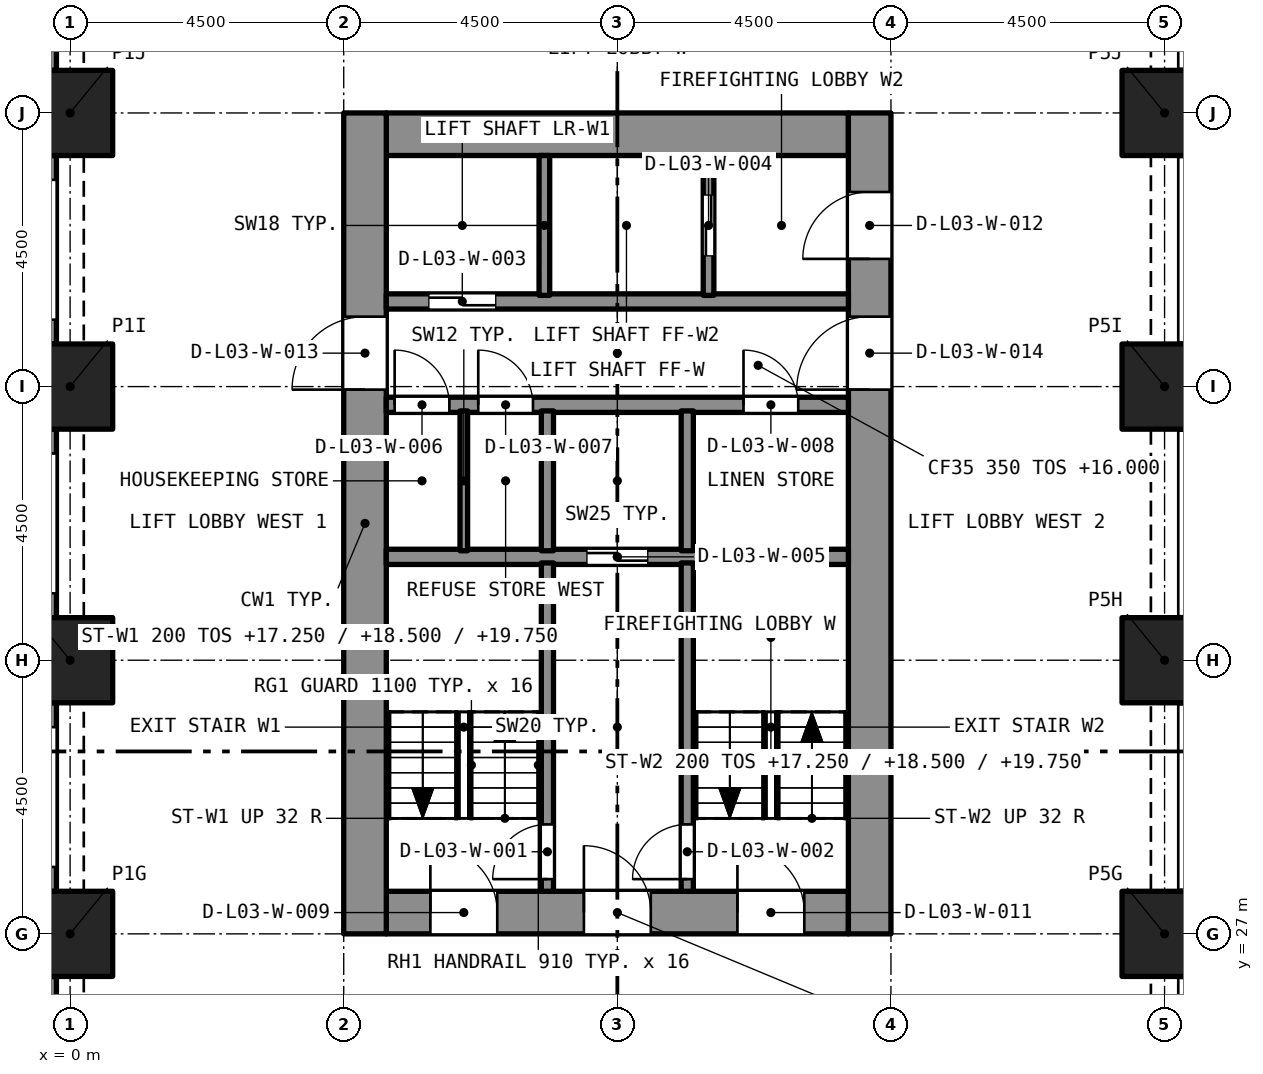
"""IFC4 building model, lengths in metres.
Left out: names, types, materials, properties, quantities, classifications, styles, units other than length and angle.
Written with IfcOpenShell. Run it as: python <this file> out.ifc"""

import sys

from ifc_helpers import new_model, si_unit, direction, frame, frame_2d, origin, origin_2d, place, context, subcontext, project, spatial, rectangle, extrude, element, fill, save


model = new_model("IFC4")
c1 = context("Model", 3, precision=1e-05, world=origin(), true_north=direction((0.0, 1.0)))
c2 = subcontext(c1, "Body", "Model", "MODEL_VIEW")
j1 = project(units=[si_unit("LENGTHUNIT", "METRE"), si_unit("PLANEANGLEUNIT", "RADIAN")], contexts=[c1])
p1 = place(None, origin())
s1 = spatial("IfcSite", under=j1, at=p1, CompositionType="ELEMENT")
p2 = place(p1, origin())
s2 = spatial("IfcBuilding", under=s1, at=p2, CompositionType="ELEMENT")
p3 = place(p2, frame((0.0, 0.0, 16.0)))
s3 = spatial("IfcBuildingStorey", under=s2, at=p3, CompositionType="ELEMENT", Elevation=16.0)
for number, where, z_axis, x_axis in (
    (1, (0.0, 27.0, 0.0), (0.0, 0.0, 1.0), (1.0, 0.0, 0.0)),
    (2, (18.0, 27.0, 0.0), (0.0, 0.0, 1.0), (1.0, 0.0, 0.0)),
    (3, (0.0, 31.5, 0.0), (0.0, 0.0, 1.0), (1.0, 0.0, 0.0)),
    (4, (18.0, 31.5, 0.0), (0.0, 0.0, 1.0), (1.0, 0.0, 0.0)),
    (5, (0.0, 36.0, 0.0), (0.0, 0.0, 1.0), (1.0, 0.0, 0.0)),
    (6, (18.0, 36.0, 0.0), (0.0, 0.0, 1.0), (1.0, 0.0, 0.0)),
    (7, (0.0, 40.5, 0.0), (0.0, 0.0, 1.0), (1.0, 0.0, 0.0)),
    (8, (18.0, 40.5, 0.0), (0.0, 0.0, 1.0), (1.0, 0.0, 0.0)),
):
    element("IfcColumn", number, at=place(p3, frame(where, z_axis=z_axis, x_axis=x_axis)), inside=s3, PredefinedType="COLUMN", context=c2, shape_type="SweptSolid", body=[
        extrude(rectangle(XDim=1.4, YDim=1.4, at=origin_2d()), origin(), (0.0, 0.0, 1.0), 5.0),
    ])
p4 = place(p3, frame((5.2, 27.35, 0.0), z_axis=(0.0, 0.0, 1.0), x_axis=(1.0, 0.0, 0.0)))
e9 = element("IfcWall", 9, at=p4, inside=s3, PredefinedType="SOLIDWALL", context=c2, shape_type="SweptSolid", body=[
    extrude(rectangle(XDim=7.6, YDim=0.7, at=frame_2d((3.8, 0.0))), origin(), (0.0, 0.0, 1.0), 5.0),
])
p5 = place(p4, frame((0.725, 0.0, 0.0)))
e10 = element("IfcOpeningElement", 10, at=p5, cuts=e9, PredefinedType="OPENING", context=c2, shape_type="SweptSolid", body=[
    extrude(rectangle(XDim=1.1, YDim=2.1, at=frame_2d((0.55, 1.05))), frame((0.0, 0.36, 0.0), z_axis=(0.0, -1.0, 0.0), x_axis=(1.0, 0.0, 0.0)), (0.0, 0.0, 1.0), 0.72),
])
p6 = place(p4, frame((3.25, 0.0, 0.0)))
e11 = element("IfcOpeningElement", 11, at=p6, cuts=e9, PredefinedType="OPENING", context=c2, shape_type="SweptSolid", body=[
    extrude(rectangle(XDim=1.1, YDim=2.1, at=frame_2d((0.55, 1.05))), frame((0.0, 0.36, 0.0), z_axis=(0.0, -1.0, 0.0), x_axis=(1.0, 0.0, 0.0)), (0.0, 0.0, 1.0), 0.72),
])
p7 = place(p4, frame((5.775, 0.0, 0.0)))
e12 = element("IfcOpeningElement", 12, at=p7, cuts=e9, PredefinedType="OPENING", context=c2, shape_type="SweptSolid", body=[
    extrude(rectangle(XDim=1.1, YDim=2.1, at=frame_2d((0.55, 1.05))), frame((0.0, 0.36, 0.0), z_axis=(0.0, -1.0, 0.0), x_axis=(1.0, 0.0, 0.0)), (0.0, 0.0, 1.0), 0.72),
])
p8 = place(p3, frame((5.2, 40.15, 0.0), z_axis=(0.0, 0.0, 1.0), x_axis=(1.0, 0.0, 0.0)))
e13 = element("IfcWall", 13, at=p8, inside=s3, PredefinedType="SOLIDWALL", context=c2, shape_type="SweptSolid", body=[
    extrude(rectangle(XDim=7.6, YDim=0.7, at=frame_2d((3.8, 0.0))), origin(), (0.0, 0.0, 1.0), 5.0),
])
p9 = place(p3, frame((4.85, 27.0, 0.0), z_axis=(0.0, 0.0, 1.0), x_axis=(0.0, 1.0, 0.0)))
e14 = element("IfcWall", 14, at=p9, inside=s3, PredefinedType="SOLIDWALL", context=c2, shape_type="SweptSolid", body=[
    extrude(rectangle(XDim=13.5, YDim=0.7, at=frame_2d((6.75, 0.0))), origin(), (0.0, 0.0, 1.0), 5.0),
])
p10 = place(p9, frame((8.95, 0.0, 0.0)))
e15 = element("IfcOpeningElement", 15, at=p10, cuts=e14, PredefinedType="OPENING", context=c2, shape_type="SweptSolid", body=[
    extrude(rectangle(XDim=1.2, YDim=2.1, at=frame_2d((0.6, 1.05))), frame((0.0, 0.36, 0.0), z_axis=(0.0, -1.0, 0.0), x_axis=(1.0, 0.0, 0.0)), (0.0, 0.0, 1.0), 0.72),
])
p11 = place(p3, frame((13.15, 27.0, 0.0), z_axis=(0.0, 0.0, 1.0), x_axis=(0.0, 1.0, 0.0)))
e16 = element("IfcWall", 16, at=p11, inside=s3, PredefinedType="SOLIDWALL", context=c2, shape_type="SweptSolid", body=[
    extrude(rectangle(XDim=13.5, YDim=0.7, at=frame_2d((6.75, 0.0))), origin(), (0.0, 0.0, 1.0), 5.0),
])
p12 = place(p11, frame((11.1, 0.0, 0.0)))
e17 = element("IfcOpeningElement", 17, at=p12, cuts=e16, PredefinedType="OPENING", context=c2, shape_type="SweptSolid", body=[
    extrude(rectangle(XDim=1.1, YDim=2.1, at=frame_2d((0.55, 1.05))), frame((0.0, 0.36, 0.0), z_axis=(0.0, -1.0, 0.0), x_axis=(1.0, 0.0, 0.0)), (0.0, 0.0, 1.0), 0.72),
])
p13 = place(p11, frame((8.95, 0.0, 0.0)))
e18 = element("IfcOpeningElement", 18, at=p13, cuts=e16, PredefinedType="OPENING", context=c2, shape_type="SweptSolid", body=[
    extrude(rectangle(XDim=1.2, YDim=2.1, at=frame_2d((0.6, 1.05))), frame((0.0, 0.36, 0.0), z_axis=(0.0, -1.0, 0.0), x_axis=(1.0, 0.0, 0.0)), (0.0, 0.0, 1.0), 0.72),
])
p14 = place(p3, frame((-0.375, 41.2, 0.0), z_axis=(0.0, 0.0, 1.0), x_axis=(0.0, 1.0, 0.0)))
e19 = element("IfcWall", 19, at=p14, inside=s3, PredefinedType="SOLIDWALL", context=c2, shape_type="SweptSolid", body=[
    extrude(rectangle(XDim=3.1, YDim=0.3, at=frame_2d((1.55, 0.0))), origin(), (0.0, 0.0, 1.0), 5.0),
])
p15 = place(p14, frame((0.4, 0.0, 0.45)))
e20 = element("IfcOpeningElement", 20, at=p15, cuts=e19, PredefinedType="OPENING", context=c2, shape_type="SweptSolid", body=[
    extrude(rectangle(XDim=2.3, YDim=3.3, at=frame_2d((1.15, 1.65))), frame((0.0, 0.16, 0.0), z_axis=(0.0, -1.0, 0.0), x_axis=(1.0, 0.0, 0.0)), (0.0, 0.0, 1.0), 0.32),
])
p16 = place(p3, frame((-0.375, 36.7, 0.0), z_axis=(0.0, 0.0, 1.0), x_axis=(0.0, 1.0, 0.0)))
e21 = element("IfcWall", 21, at=p16, inside=s3, PredefinedType="SOLIDWALL", context=c2, shape_type="SweptSolid", body=[
    extrude(rectangle(XDim=3.1, YDim=0.3, at=frame_2d((1.55, 0.0))), origin(), (0.0, 0.0, 1.0), 5.0),
])
p17 = place(p16, frame((0.4, 0.0, 0.45)))
e22 = element("IfcOpeningElement", 22, at=p17, cuts=e21, PredefinedType="OPENING", context=c2, shape_type="SweptSolid", body=[
    extrude(rectangle(XDim=2.3, YDim=3.3, at=frame_2d((1.15, 1.65))), frame((0.0, 0.16, 0.0), z_axis=(0.0, -1.0, 0.0), x_axis=(1.0, 0.0, 0.0)), (0.0, 0.0, 1.0), 0.32),
])
p18 = place(p3, frame((-0.375, 32.2, 0.0), z_axis=(0.0, 0.0, 1.0), x_axis=(0.0, 1.0, 0.0)))
e23 = element("IfcWall", 23, at=p18, inside=s3, PredefinedType="SOLIDWALL", context=c2, shape_type="SweptSolid", body=[
    extrude(rectangle(XDim=3.1, YDim=0.3, at=frame_2d((1.55, 0.0))), origin(), (0.0, 0.0, 1.0), 5.0),
])
p19 = place(p18, frame((0.4, 0.0, 0.45)))
e24 = element("IfcOpeningElement", 24, at=p19, cuts=e23, PredefinedType="OPENING", context=c2, shape_type="SweptSolid", body=[
    extrude(rectangle(XDim=2.3, YDim=3.3, at=frame_2d((1.15, 1.65))), frame((0.0, 0.16, 0.0), z_axis=(0.0, -1.0, 0.0), x_axis=(1.0, 0.0, 0.0)), (0.0, 0.0, 1.0), 0.32),
])
p20 = place(p3, frame((-0.375, 27.7, 0.0), z_axis=(0.0, 0.0, 1.0), x_axis=(0.0, 1.0, 0.0)))
e25 = element("IfcWall", 25, at=p20, inside=s3, PredefinedType="SOLIDWALL", context=c2, shape_type="SweptSolid", body=[
    extrude(rectangle(XDim=3.1, YDim=0.3, at=frame_2d((1.55, 0.0))), origin(), (0.0, 0.0, 1.0), 5.0),
])
p21 = place(p20, frame((0.4, 0.0, 0.45)))
e26 = element("IfcOpeningElement", 26, at=p21, cuts=e25, PredefinedType="OPENING", context=c2, shape_type="SweptSolid", body=[
    extrude(rectangle(XDim=2.3, YDim=3.3, at=frame_2d((1.15, 1.65))), frame((0.0, 0.16, 0.0), z_axis=(0.0, -1.0, 0.0), x_axis=(1.0, 0.0, 0.0)), (0.0, 0.0, 1.0), 0.32),
])
p22 = place(p3, frame((-0.375, 23.2, 0.0), z_axis=(0.0, 0.0, 1.0), x_axis=(0.0, 1.0, 0.0)))
e27 = element("IfcWall", 27, at=p22, inside=s3, PredefinedType="SOLIDWALL", context=c2, shape_type="SweptSolid", body=[
    extrude(rectangle(XDim=3.1, YDim=0.3, at=frame_2d((1.55, 0.0))), origin(), (0.0, 0.0, 1.0), 5.0),
])
p23 = place(p22, frame((0.4, 0.0, 0.45)))
e28 = element("IfcOpeningElement", 28, at=p23, cuts=e27, PredefinedType="OPENING", context=c2, shape_type="SweptSolid", body=[
    extrude(rectangle(XDim=2.3, YDim=3.3, at=frame_2d((1.15, 1.65))), frame((0.0, 0.16, 0.0), z_axis=(0.0, -1.0, 0.0), x_axis=(1.0, 0.0, 0.0)), (0.0, 0.0, 1.0), 0.32),
])
p24 = place(p3, frame((5.2, 33.2, 0.0), z_axis=(0.0, 0.0, 1.0), x_axis=(1.0, 0.0, 0.0)))
e29 = element("IfcWall", 29, at=p24, inside=s3, PredefinedType="SOLIDWALL", context=c2, shape_type="SweptSolid", body=[
    extrude(rectangle(XDim=7.6, YDim=0.25, at=frame_2d((3.8, 0.0))), origin(), (0.0, 0.0, 1.0), 4.65),
])
p25 = place(p24, frame((3.3, 0.0, 0.0)))
e30 = element("IfcOpeningElement", 30, at=p25, cuts=e29, PredefinedType="OPENING", context=c2, shape_type="SweptSolid", body=[
    extrude(rectangle(XDim=1.0, YDim=2.1, at=frame_2d((0.5, 1.05))), frame((0.0, 0.135, 0.0), z_axis=(0.0, -1.0, 0.0), x_axis=(1.0, 0.0, 0.0)), (0.0, 0.0, 1.0), 0.27),
])
p26 = place(p3, frame((5.2, 35.7, 0.0), z_axis=(0.0, 0.0, 1.0), x_axis=(1.0, 0.0, 0.0)))
e31 = element("IfcWall", 31, at=p26, inside=s3, PredefinedType="SOLIDWALL", context=c2, shape_type="SweptSolid", body=[
    extrude(rectangle(XDim=7.6, YDim=0.25, at=frame_2d((3.8, 0.0))), origin(), (0.0, 0.0, 1.0), 4.65),
])
p27 = place(p26, frame((0.137, 0.0, 0.0)))
e32 = element("IfcOpeningElement", 32, at=p27, cuts=e31, PredefinedType="OPENING", context=c2, shape_type="SweptSolid", body=[
    extrude(rectangle(XDim=0.9, YDim=2.1, at=frame_2d((0.45, 1.05))), frame((0.0, 0.135, 0.0), z_axis=(0.0, -1.0, 0.0), x_axis=(1.0, 0.0, 0.0)), (0.0, 0.0, 1.0), 0.27),
])
p28 = place(p26, frame((1.512, 0.0, 0.0)))
e33 = element("IfcOpeningElement", 33, at=p28, cuts=e31, PredefinedType="OPENING", context=c2, shape_type="SweptSolid", body=[
    extrude(rectangle(XDim=0.9, YDim=2.1, at=frame_2d((0.45, 1.05))), frame((0.0, 0.135, 0.0), z_axis=(0.0, -1.0, 0.0), x_axis=(1.0, 0.0, 0.0)), (0.0, 0.0, 1.0), 0.27),
])
p29 = place(p26, frame((5.875, 0.0, 0.0)))
e34 = element("IfcOpeningElement", 34, at=p29, cuts=e31, PredefinedType="OPENING", context=c2, shape_type="SweptSolid", body=[
    extrude(rectangle(XDim=0.9, YDim=2.1, at=frame_2d((0.45, 1.05))), frame((0.0, 0.135, 0.0), z_axis=(0.0, -1.0, 0.0), x_axis=(1.0, 0.0, 0.0)), (0.0, 0.0, 1.0), 0.27),
])
p30 = place(p3, frame((5.2, 37.4, 0.0), z_axis=(0.0, 0.0, 1.0), x_axis=(1.0, 0.0, 0.0)))
e35 = element("IfcWall", 35, at=p30, inside=s3, PredefinedType="SOLIDWALL", context=c2, shape_type="SweptSolid", body=[
    extrude(rectangle(XDim=7.6, YDim=0.25, at=frame_2d((3.8, 0.0))), origin(), (0.0, 0.0, 1.0), 4.65),
])
p31 = place(p30, frame((0.7, 0.0, 0.0)))
e36 = element("IfcOpeningElement", 36, at=p31, cuts=e35, PredefinedType="OPENING", context=c2, shape_type="SweptSolid", body=[
    extrude(rectangle(XDim=1.1, YDim=2.4, at=frame_2d((0.55, 1.2))), frame((0.0, 0.135, 0.0), z_axis=(0.0, -1.0, 0.0), x_axis=(1.0, 0.0, 0.0)), (0.0, 0.0, 1.0), 0.27),
])
p32 = place(p3, frame((7.85, 27.7, 0.0), z_axis=(0.0, 0.0, 1.0), x_axis=(0.0, 1.0, 0.0)))
e37 = element("IfcWall", 37, at=p32, inside=s3, PredefinedType="SOLIDWALL", context=c2, shape_type="SweptSolid", body=[
    extrude(rectangle(XDim=5.4, YDim=0.2, at=frame_2d((2.7, 0.0))), origin(), (0.0, 0.0, 1.0), 4.65),
])
p33 = place(p32, frame((0.2, 0.0, 0.0)))
e38 = element("IfcOpeningElement", 38, at=p33, cuts=e37, PredefinedType="OPENING", context=c2, shape_type="SweptSolid", body=[
    extrude(rectangle(XDim=0.9, YDim=2.1, at=frame_2d((0.45, 1.05))), frame((0.0, 0.11, 0.0), z_axis=(0.0, -1.0, 0.0), x_axis=(1.0, 0.0, 0.0)), (0.0, 0.0, 1.0), 0.22),
])
p34 = place(p3, frame((10.15, 27.7, 0.0), z_axis=(0.0, 0.0, 1.0), x_axis=(0.0, 1.0, 0.0)))
e39 = element("IfcWall", 39, at=p34, inside=s3, PredefinedType="SOLIDWALL", context=c2, shape_type="SweptSolid", body=[
    extrude(rectangle(XDim=5.4, YDim=0.2, at=frame_2d((2.7, 0.0))), origin(), (0.0, 0.0, 1.0), 4.65),
])
p35 = place(p34, frame((0.2, 0.0, 0.0)))
e40 = element("IfcOpeningElement", 40, at=p35, cuts=e39, PredefinedType="OPENING", context=c2, shape_type="SweptSolid", body=[
    extrude(rectangle(XDim=0.9, YDim=2.1, at=frame_2d((0.45, 1.05))), frame((0.0, 0.11, 0.0), z_axis=(0.0, -1.0, 0.0), x_axis=(1.0, 0.0, 0.0)), (0.0, 0.0, 1.0), 0.22),
])
for number, where, z_axis, x_axis in (
    (41, (7.85, 33.3, 0.0), (0.0, 0.0, 1.0), (0.0, 1.0, 0.0)),
    (42, (10.15, 33.3, 0.0), (0.0, 0.0, 1.0), (0.0, 1.0, 0.0)),
):
    element("IfcWall", number, at=place(p3, frame(where, z_axis=z_axis, x_axis=x_axis)), inside=s3, PredefinedType="SOLIDWALL", context=c2, shape_type="SweptSolid", body=[
        extrude(rectangle(XDim=2.3, YDim=0.2, at=frame_2d((1.15, 0.0))), origin(), (0.0, 0.0, 1.0), 4.65),
    ])
p36 = place(p3, frame((7.8, 37.5, 0.0), z_axis=(0.0, 0.0, 1.0), x_axis=(0.0, 1.0, 0.0)))
e43 = element("IfcWall", 43, at=p36, inside=s3, PredefinedType="SOLIDWALL", context=c2, shape_type="SweptSolid", body=[
    extrude(rectangle(XDim=2.3, YDim=0.175, at=frame_2d((1.15, 0.0))), origin(), (0.0, 0.0, 1.0), 4.65),
])
p37 = place(p3, frame((10.5, 37.5, 0.0), z_axis=(0.0, 0.0, 1.0), x_axis=(0.0, 1.0, 0.0)))
e44 = element("IfcWall", 44, at=p37, inside=s3, PredefinedType="SOLIDWALL", context=c2, shape_type="SweptSolid", body=[
    extrude(rectangle(XDim=2.3, YDim=0.175, at=frame_2d((1.15, 0.0))), origin(), (0.0, 0.0, 1.0), 4.65),
])
p38 = place(p37, frame((0.65, 0.0, 0.0)))
e45 = element("IfcOpeningElement", 45, at=p38, cuts=e44, PredefinedType="OPENING", context=c2, shape_type="SweptSolid", body=[
    extrude(rectangle(XDim=1.0, YDim=2.1, at=frame_2d((0.5, 1.05))), frame((0.0, 0.097, 0.0), z_axis=(0.0, -1.0, 0.0), x_axis=(1.0, 0.0, 0.0)), (0.0, 0.0, 1.0), 0.195),
])
p39 = place(p3, frame((6.475, 33.3, 0.0), z_axis=(0.0, 0.0, 1.0), x_axis=(0.0, 1.0, 0.0)))
e46 = element("IfcWall", 46, at=p39, inside=s3, PredefinedType="PARTITIONING", context=c2, shape_type="SweptSolid", body=[
    extrude(rectangle(XDim=2.3, YDim=0.125, at=frame_2d((1.15, 0.0))), origin(), (0.0, 0.0, 1.0), 4.65),
])
p40 = place(p33, origin())
e47 = element("IfcDoor", 47, at=p40, inside=s3, OperationType="SINGLE_SWING_LEFT", PredefinedType="DOOR", context=c2, shape_type="SweptSolid", body=[
    extrude(rectangle(XDim=0.9, YDim=2.1, at=frame_2d((0.45, 1.05))), frame((0.0, 0.025, 0.0), z_axis=(0.0, -1.0, 0.0), x_axis=(1.0, 0.0, 0.0)), (0.0, 0.0, 1.0), 0.05),
])
fill(e38, e47)
p41 = place(p35, origin())
e48 = element("IfcDoor", 48, at=p41, inside=s3, OperationType="SINGLE_SWING_LEFT", PredefinedType="DOOR", context=c2, shape_type="SweptSolid", body=[
    extrude(rectangle(XDim=0.9, YDim=2.1, at=frame_2d((0.45, 1.05))), frame((0.0, 0.025, 0.0), z_axis=(0.0, -1.0, 0.0), x_axis=(1.0, 0.0, 0.0)), (0.0, 0.0, 1.0), 0.05),
])
fill(e40, e48)
p42 = place(p31, origin())
e49 = element("IfcDoor", 49, at=p42, inside=s3, OperationType="SLIDING_TO_LEFT", PredefinedType="DOOR", context=c2, shape_type="SweptSolid", body=[
    extrude(rectangle(XDim=1.1, YDim=2.4, at=frame_2d((0.55, 1.2))), frame((0.0, 0.025, 0.0), z_axis=(0.0, -1.0, 0.0), x_axis=(1.0, 0.0, 0.0)), (0.0, 0.0, 1.0), 0.05),
])
fill(e36, e49)
p43 = place(p38, origin())
e50 = element("IfcDoor", 50, at=p43, inside=s3, OperationType="SLIDING_TO_LEFT", PredefinedType="DOOR", context=c2, shape_type="SweptSolid", body=[
    extrude(rectangle(XDim=1.0, YDim=2.1, at=frame_2d((0.5, 1.05))), frame((0.0, 0.025, 0.0), z_axis=(0.0, -1.0, 0.0), x_axis=(1.0, 0.0, 0.0)), (0.0, 0.0, 1.0), 0.05),
])
fill(e45, e50)
p44 = place(p25, origin())
e51 = element("IfcDoor", 51, at=p44, inside=s3, OperationType="SLIDING_TO_LEFT", PredefinedType="DOOR", context=c2, shape_type="SweptSolid", body=[
    extrude(rectangle(XDim=1.0, YDim=2.1, at=frame_2d((0.5, 1.05))), frame((0.0, 0.025, 0.0), z_axis=(0.0, -1.0, 0.0), x_axis=(1.0, 0.0, 0.0)), (0.0, 0.0, 1.0), 0.05),
])
fill(e30, e51)
p45 = place(p27, origin())
e52 = element("IfcDoor", 52, at=p45, inside=s3, OperationType="SINGLE_SWING_LEFT", PredefinedType="DOOR", context=c2, shape_type="SweptSolid", body=[
    extrude(rectangle(XDim=0.9, YDim=2.1, at=frame_2d((0.45, 1.05))), frame((0.0, 0.025, 0.0), z_axis=(0.0, -1.0, 0.0), x_axis=(1.0, 0.0, 0.0)), (0.0, 0.0, 1.0), 0.05),
])
fill(e32, e52)
p46 = place(p28, origin())
e53 = element("IfcDoor", 53, at=p46, inside=s3, OperationType="SINGLE_SWING_LEFT", PredefinedType="DOOR", context=c2, shape_type="SweptSolid", body=[
    extrude(rectangle(XDim=0.9, YDim=2.1, at=frame_2d((0.45, 1.05))), frame((0.0, 0.025, 0.0), z_axis=(0.0, -1.0, 0.0), x_axis=(1.0, 0.0, 0.0)), (0.0, 0.0, 1.0), 0.05),
])
fill(e33, e53)
p47 = place(p29, origin())
e54 = element("IfcDoor", 54, at=p47, inside=s3, OperationType="SINGLE_SWING_LEFT", PredefinedType="DOOR", context=c2, shape_type="SweptSolid", body=[
    extrude(rectangle(XDim=0.9, YDim=2.1, at=frame_2d((0.45, 1.05))), frame((0.0, 0.025, 0.0), z_axis=(0.0, -1.0, 0.0), x_axis=(1.0, 0.0, 0.0)), (0.0, 0.0, 1.0), 0.05),
])
fill(e34, e54)
p48 = place(p5, origin())
e55 = element("IfcDoor", 55, at=p48, inside=s3, OperationType="SINGLE_SWING_LEFT", PredefinedType="DOOR", context=c2, shape_type="SweptSolid", body=[
    extrude(rectangle(XDim=1.1, YDim=2.1, at=frame_2d((0.55, 1.05))), frame((0.0, 0.025, 0.0), z_axis=(0.0, -1.0, 0.0), x_axis=(1.0, 0.0, 0.0)), (0.0, 0.0, 1.0), 0.05),
])
fill(e10, e55)
p49 = place(p6, origin())
e56 = element("IfcDoor", 56, at=p49, inside=s3, OperationType="SINGLE_SWING_LEFT", PredefinedType="DOOR", context=c2, shape_type="SweptSolid", body=[
    extrude(rectangle(XDim=1.1, YDim=2.1, at=frame_2d((0.55, 1.05))), frame((0.0, 0.025, 0.0), z_axis=(0.0, -1.0, 0.0), x_axis=(1.0, 0.0, 0.0)), (0.0, 0.0, 1.0), 0.05),
])
fill(e11, e56)
p50 = place(p7, origin())
e57 = element("IfcDoor", 57, at=p50, inside=s3, OperationType="SINGLE_SWING_LEFT", PredefinedType="DOOR", context=c2, shape_type="SweptSolid", body=[
    extrude(rectangle(XDim=1.1, YDim=2.1, at=frame_2d((0.55, 1.05))), frame((0.0, 0.025, 0.0), z_axis=(0.0, -1.0, 0.0), x_axis=(1.0, 0.0, 0.0)), (0.0, 0.0, 1.0), 0.05),
])
fill(e12, e57)
p51 = place(p12, origin())
e58 = element("IfcDoor", 58, at=p51, inside=s3, OperationType="SINGLE_SWING_LEFT", PredefinedType="DOOR", context=c2, shape_type="SweptSolid", body=[
    extrude(rectangle(XDim=1.1, YDim=2.1, at=frame_2d((0.55, 1.05))), frame((0.0, 0.025, 0.0), z_axis=(0.0, -1.0, 0.0), x_axis=(1.0, 0.0, 0.0)), (0.0, 0.0, 1.0), 0.05),
])
fill(e17, e58)
p52 = place(p10, origin())
e59 = element("IfcDoor", 59, at=p52, inside=s3, OperationType="SINGLE_SWING_LEFT", PredefinedType="DOOR", context=c2, shape_type="SweptSolid", body=[
    extrude(rectangle(XDim=1.2, YDim=2.1, at=frame_2d((0.6, 1.05))), frame((0.0, 0.025, 0.0), z_axis=(0.0, -1.0, 0.0), x_axis=(1.0, 0.0, 0.0)), (0.0, 0.0, 1.0), 0.05),
])
fill(e15, e59)
p53 = place(p13, origin())
e60 = element("IfcDoor", 60, at=p53, inside=s3, OperationType="SINGLE_SWING_LEFT", PredefinedType="DOOR", context=c2, shape_type="SweptSolid", body=[
    extrude(rectangle(XDim=1.2, YDim=2.1, at=frame_2d((0.6, 1.05))), frame((0.0, 0.025, 0.0), z_axis=(0.0, -1.0, 0.0), x_axis=(1.0, 0.0, 0.0)), (0.0, 0.0, 1.0), 0.05),
])
fill(e18, e60)
save(model, sys.argv[1])
